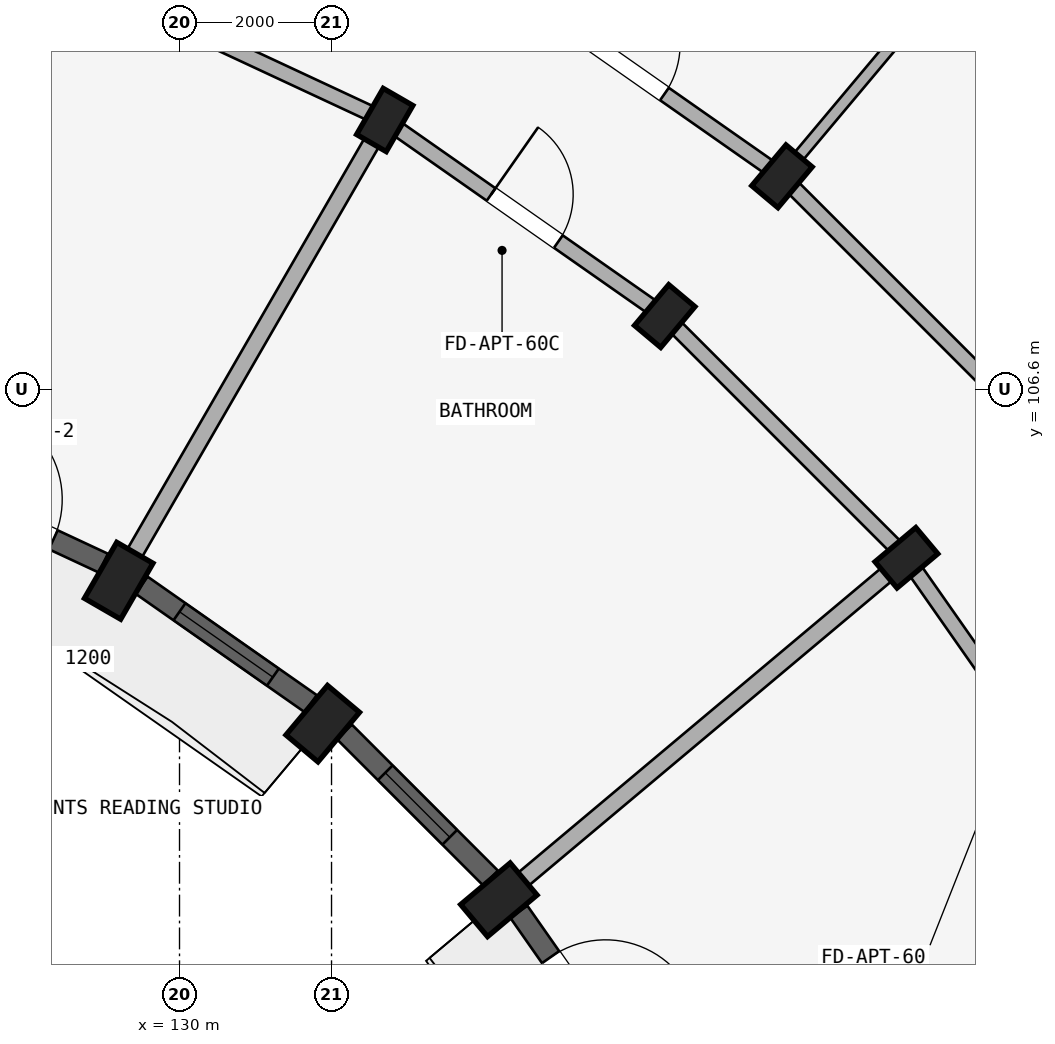
"""IFC4 building model, lengths in metres.
Left out: names, types, materials, properties, quantities, classifications, styles, units other than length and angle.
Written with IfcOpenShell. Run it as: python <this file> out.ifc"""

import sys

from ifc_helpers import new_model, si_unit, direction, frame, frame_2d, origin, origin_2d, place, context, subcontext, project, spatial, rectangle, extrude, element, fill, save


model = new_model("IFC4")
c1 = context("Model", 3, precision=1e-05, world=origin(), true_north=direction((0.0, 1.0)))
c2 = subcontext(c1, "Body", "Model", "MODEL_VIEW")
j1 = project(units=[si_unit("LENGTHUNIT", "METRE"), si_unit("PLANEANGLEUNIT", "RADIAN")], contexts=[c1])
p1 = place(None, origin())
s1 = spatial("IfcSite", under=j1, at=p1, CompositionType="ELEMENT")
p2 = place(p1, origin())
s2 = spatial("IfcBuilding", under=s1, at=p2, CompositionType="ELEMENT")
p3 = place(p2, frame((0.0, 0.0, 15.0)))
s3 = spatial("IfcBuildingStorey", under=s2, at=p3, CompositionType="ELEMENT", Elevation=15.0)
p4 = place(p3, frame((129.2, 104.081, 0.0), z_axis=(0.0, 0.0, 1.0), x_axis=(-0.866025403784, 0.5, 0.0)))
e1 = element("IfcColumn", 1, at=p4, inside=s3, PredefinedType="COLUMN", context=c2, shape_type="SweptSolid", body=[
    extrude(rectangle(XDim=0.55, YDim=0.85, at=origin_2d()), origin(), (0.0, 0.0, 1.0), 2.93),
])
p5 = place(p3, frame((132.7, 110.144, 0.0), z_axis=(0.0, 0.0, 1.0), x_axis=(-0.866025403784, 0.5, 0.0)))
e2 = element("IfcColumn", 2, at=p5, inside=s3, PredefinedType="COLUMN", context=c2, shape_type="SweptSolid", body=[
    extrude(rectangle(XDim=0.45, YDim=0.7, at=origin_2d()), origin(), (0.0, 0.0, 1.0), 2.93),
])
p6 = place(p3, frame((131.885, 102.202, 0.0), z_axis=(0.0, 0.0, 1.0), x_axis=(-0.766044443119, 0.642787609687, 0.0)))
e3 = element("IfcColumn", 3, at=p6, inside=s3, PredefinedType="COLUMN", context=c2, shape_type="SweptSolid", body=[
    extrude(rectangle(XDim=0.55, YDim=0.85, at=origin_2d()), origin(), (0.0, 0.0, 1.0), 2.93),
])
for number, where, z_axis, x_axis in (
    (4, (136.384, 107.564, 0.0), (0.0, 0.0, 1.0), (-0.766, 0.643, 0.0)),
    (5, (137.927, 109.402, 0.0), (0.0, 0.0, 1.0), (-0.766, 0.643, 0.0)),
):
    element("IfcColumn", number, at=place(p3, frame(where, z_axis=z_axis, x_axis=x_axis)), inside=s3, PredefinedType="COLUMN", context=c2, shape_type="SweptSolid", body=[
        extrude(rectangle(XDim=0.45, YDim=0.7, at=origin_2d()), origin(), (0.0, 0.0, 1.0), 2.93),
    ])
p7 = place(p3, frame((134.202, 99.885, 0.0), z_axis=(0.0, 0.0, 1.0), x_axis=(-0.642787609687, 0.766044443119, 0.0)))
e6 = element("IfcColumn", 6, at=p7, inside=s3, PredefinedType="COLUMN", context=c2, shape_type="SweptSolid", body=[
    extrude(rectangle(XDim=0.55, YDim=0.85, at=origin_2d()), origin(), (0.0, 0.0, 1.0), 2.93),
])
p8 = place(p3, frame((139.564, 104.384, 0.0), z_axis=(0.0, 0.0, 1.0), x_axis=(-0.642787609687, 0.766044443119, 0.0)))
e7 = element("IfcColumn", 7, at=p8, inside=s3, PredefinedType="COLUMN", context=c2, shape_type="SweptSolid", body=[
    extrude(rectangle(XDim=0.45, YDim=0.7, at=origin_2d()), origin(), (0.0, 0.0, 1.0), 2.93),
])
p9 = place(p3, frame((128.624, 112.044, 0.0), z_axis=(0.0, 0.0, 1.0), x_axis=(0.906307919131, -0.422617978463, 0.0)))
e8 = element("IfcWall", 8, at=p9, inside=s3, PredefinedType="STANDARD", context=c2, shape_type="SweptSolid", body=[
    extrude(rectangle(XDim=4.497, YDim=0.2, at=frame_2d((2.249, 0.0))), origin(), (0.0, 0.0, 1.0), 2.372),
])
p10 = place(p3, frame((132.7, 110.144, 0.0), z_axis=(0.0, 0.0, 1.0), x_axis=(0.819155404658, -0.573571637217, 0.0)))
e9 = element("IfcWall", 9, at=p10, inside=s3, PredefinedType="STANDARD", context=c2, shape_type="SweptSolid", body=[
    extrude(rectangle(XDim=4.497, YDim=0.2, at=frame_2d((2.249, 0.0))), origin(), (0.0, 0.0, 1.0), 2.372),
])
p11 = place(p10, frame((1.709, 0.0, 0.0)))
e10 = element("IfcOpeningElement", 10, at=p11, cuts=e9, PredefinedType="OPENING", context=c2, shape_type="SweptSolid", body=[
    extrude(rectangle(XDim=1.08, YDim=2.15, at=frame_2d((0.54, 1.075))), frame((0.0, 0.11, 0.0), z_axis=(0.0, -1.0, 0.0), x_axis=(1.0, 0.0, 0.0)), (0.0, 0.0, 1.0), 0.22),
])
p12 = place(p3, frame((133.9, 112.222, 0.0), z_axis=(0.0, 0.0, 1.0), x_axis=(0.819140911474, -0.573592335331, 0.0)))
e11 = element("IfcWall", 11, at=p12, inside=s3, PredefinedType="STANDARD", context=c2, shape_type="SweptSolid", body=[
    extrude(rectangle(XDim=4.916, YDim=0.2, at=frame_2d((2.458, 0.0))), origin(), (0.0, 0.0, 1.0), 2.372),
])
p13 = place(p12, frame((1.888, 0.0, 0.0)))
e12 = element("IfcOpeningElement", 12, at=p13, cuts=e11, PredefinedType="OPENING", context=c2, shape_type="SweptSolid", body=[
    extrude(rectangle(XDim=1.14, YDim=2.15, at=frame_2d((0.57, 1.075))), frame((0.0, 0.11, 0.0), z_axis=(0.0, -1.0, 0.0), x_axis=(1.0, 0.0, 0.0)), (0.0, 0.0, 1.0), 0.22),
])
p14 = place(p3, frame((136.384, 107.564, 0.0), z_axis=(0.0, 0.0, 1.0), x_axis=(0.707106781187, -0.707106781187, 0.0)))
e13 = element("IfcWall", 13, at=p14, inside=s3, PredefinedType="STANDARD", context=c2, shape_type="SweptSolid", body=[
    extrude(rectangle(XDim=4.497, YDim=0.2, at=frame_2d((2.249, 0.0))), origin(), (0.0, 0.0, 1.0), 2.372),
])
p15 = place(p3, frame((137.927, 109.402, 0.0), z_axis=(0.0, 0.0, 1.0), x_axis=(0.707106781187, -0.707106781187, 0.0)))
e14 = element("IfcWall", 14, at=p15, inside=s3, PredefinedType="STANDARD", context=c2, shape_type="SweptSolid", body=[
    extrude(rectangle(XDim=4.916, YDim=0.2, at=frame_2d((2.458, 0.0))), origin(), (0.0, 0.0, 1.0), 2.372),
])
p16 = place(p3, frame((139.564, 104.384, 0.0), z_axis=(0.0, 0.0, 1.0), x_axis=(0.573571637217, -0.819155404658, 0.0)))
e15 = element("IfcWall", 15, at=p16, inside=s3, PredefinedType="STANDARD", context=c2, shape_type="SweptSolid", body=[
    extrude(rectangle(XDim=4.497, YDim=0.2, at=frame_2d((2.249, 0.0))), origin(), (0.0, 0.0, 1.0), 2.372),
])
p17 = place(p16, frame((1.749, 0.0, 0.0)))
e16 = element("IfcOpeningElement", 16, at=p17, cuts=e15, PredefinedType="OPENING", context=c2, shape_type="SweptSolid", body=[
    extrude(rectangle(XDim=1.0, YDim=2.15, at=frame_2d((0.5, 1.075))), frame((0.0, 0.11, 0.0), z_axis=(0.0, -1.0, 0.0), x_axis=(1.0, 0.0, 0.0)), (0.0, 0.0, 1.0), 0.22),
])
p18 = place(p3, frame((129.3, 104.254, 0.0), z_axis=(0.0, 0.0, 1.0), x_axis=(0.499997969693, 0.866026575979, 0.0)))
e17 = element("IfcWall", 17, at=p18, inside=s3, PredefinedType="STANDARD", context=c2, shape_type="SweptSolid", body=[
    extrude(rectangle(XDim=6.75, YDim=0.22, at=frame_2d((3.375, 0.0))), origin(), (0.0, 0.0, 1.0), 2.372),
])
p19 = place(p3, frame((137.991, 109.479, 0.0), z_axis=(0.0, 0.0, 1.0), x_axis=(0.642784757967, 0.766046835987, 0.0)))
e18 = element("IfcWall", 18, at=p19, inside=s3, PredefinedType="PARTITIONING", context=c2, shape_type="SweptSolid", body=[
    extrude(rectangle(XDim=17.42, YDim=0.15, at=frame_2d((8.71, 0.0))), origin(), (0.0, 0.0, 1.0), 2.372),
])
p20 = place(p19, frame((7.5, 0.0, 0.0)))
e19 = element("IfcOpeningElement", 19, at=p20, cuts=e18, PredefinedType="OPENING", context=c2, shape_type="SweptSolid", body=[
    extrude(rectangle(XDim=0.8, YDim=2.1, at=frame_2d((0.4, 1.05))), frame((0.0, 0.085, 0.0), z_axis=(0.0, -1.0, 0.0), x_axis=(1.0, 0.0, 0.0)), (0.0, 0.0, 1.0), 0.17),
])
p21 = place(p3, frame((134.355, 100.013, 0.0), z_axis=(0.0, 0.0, 1.0), x_axis=(0.766046761698, 0.642784846501, 0.0)))
e20 = element("IfcWall", 20, at=p21, inside=s3, PredefinedType="STANDARD", context=c2, shape_type="SweptSolid", body=[
    extrude(rectangle(XDim=6.75, YDim=0.22, at=frame_2d((3.375, 0.0))), origin(), (0.0, 0.0, 1.0), 2.372),
])
p22 = place(p3, frame((140.08, 111.969, 0.0), z_axis=(0.0, 0.0, 1.0), x_axis=(0.707106781187, -0.707106781187, 0.0)))
e21 = element("IfcWall", 21, at=p22, inside=s3, PredefinedType="PLUMBINGWALL", context=c2, shape_type="SweptSolid", body=[
    extrude(rectangle(XDim=5.5, YDim=0.15, at=frame_2d((2.75, 0.0))), origin(), (0.0, 0.0, 1.0), 2.372),
])
p23 = place(p22, frame((2.37, 0.0, 0.0)))
e22 = element("IfcOpeningElement", 22, at=p23, cuts=e21, PredefinedType="OPENING", context=c2, shape_type="SweptSolid", body=[
    extrude(rectangle(XDim=0.76, YDim=2.05, at=frame_2d((0.38, 1.025))), frame((0.0, 0.085, 0.0), z_axis=(0.0, -1.0, 0.0), x_axis=(1.0, 0.0, 0.0)), (0.0, 0.0, 1.0), 0.17),
])
p24 = place(p3, frame((126.536, 105.461, 0.0), z_axis=(0.0, 0.0, 1.0), x_axis=(0.906311629168, -0.422610022166, 0.0)))
e23 = element("IfcWall", 23, at=p24, inside=s3, PredefinedType="STANDARD", context=c2, shape_type="SweptSolid", body=[
    extrude(rectangle(XDim=2.718, YDim=0.275, at=frame_2d((1.359, 0.0))), origin(), (0.0, 0.0, 1.0), 2.472),
])
p25 = place(p24, frame((0.729, 0.0, 0.0)))
e24 = element("IfcOpeningElement", 24, at=p25, cuts=e23, PredefinedType="OPENING", context=c2, shape_type="SweptSolid", body=[
    extrude(rectangle(XDim=1.26, YDim=2.15, at=frame_2d((0.63, 1.075))), frame((0.0, 0.147, 0.0), z_axis=(0.0, -1.0, 0.0), x_axis=(1.0, 0.0, 0.0)), (0.0, 0.0, 1.0), 0.295),
])
p26 = place(p3, frame((129.501, 104.023, 0.0), z_axis=(0.0, 0.0, 1.0), x_axis=(0.81917282593, -0.573546755948, 0.0)))
e25 = element("IfcWall", 25, at=p26, inside=s3, PredefinedType="STANDARD", context=c2, shape_type="SweptSolid", body=[
    extrude(rectangle(XDim=2.718, YDim=0.275, at=frame_2d((1.359, 0.0))), origin(), (0.0, 0.0, 1.0), 2.472),
])
p27 = place(p26, frame((0.609, 0.0, 0.622)))
e26 = element("IfcOpeningElement", 26, at=p27, cuts=e25, PredefinedType="OPENING", context=c2, shape_type="SweptSolid", body=[
    extrude(rectangle(XDim=1.5, YDim=1.65, at=frame_2d((0.75, 0.825))), frame((0.0, 0.147, 0.0), z_axis=(0.0, -1.0, 0.0), x_axis=(1.0, 0.0, 0.0)), (0.0, 0.0, 1.0), 0.295),
])
p28 = place(p3, frame((132.171, 102.092, 0.0), z_axis=(0.0, 0.0, 1.0), x_axis=(0.707106781187, -0.707106781187, 0.0)))
e27 = element("IfcWall", 27, at=p28, inside=s3, PredefinedType="STANDARD", context=c2, shape_type="SweptSolid", body=[
    extrude(rectangle(XDim=2.718, YDim=0.275, at=frame_2d((1.359, 0.0))), origin(), (0.0, 0.0, 1.0), 2.472),
])
p29 = place(p28, frame((0.759, 0.0, 0.772)))
e28 = element("IfcOpeningElement", 28, at=p29, cuts=e27, PredefinedType="OPENING", context=c2, shape_type="SweptSolid", body=[
    extrude(rectangle(XDim=1.2, YDim=1.5, at=frame_2d((0.6, 0.75))), frame((0.0, 0.147, 0.0), z_axis=(0.0, -1.0, 0.0), x_axis=(1.0, 0.0, 0.0)), (0.0, 0.0, 1.0), 0.295),
])
p30 = place(p3, frame((134.465, 99.727, 0.0), z_axis=(0.0, 0.0, 1.0), x_axis=(0.573546755948, -0.81917282593, 0.0)))
e29 = element("IfcWall", 29, at=p30, inside=s3, PredefinedType="STANDARD", context=c2, shape_type="SweptSolid", body=[
    extrude(rectangle(XDim=2.718, YDim=0.275, at=frame_2d((1.359, 0.0))), origin(), (0.0, 0.0, 1.0), 2.472),
])
p31 = place(p30, frame((0.729, 0.0, 0.0)))
e30 = element("IfcOpeningElement", 30, at=p31, cuts=e29, PredefinedType="OPENING", context=c2, shape_type="SweptSolid", body=[
    extrude(rectangle(XDim=1.26, YDim=2.15, at=frame_2d((0.63, 1.075))), frame((0.0, 0.147, 0.0), z_axis=(0.0, -1.0, 0.0), x_axis=(1.0, 0.0, 0.0)), (0.0, 0.0, 1.0), 0.295),
])
p32 = place(p27, origin())
e31 = element("IfcWindow", 31, at=p32, inside=s3, PartitioningType="DOUBLE_PANEL_VERTICAL", PredefinedType="WINDOW", context=c2, shape_type="SweptSolid", body=[
    extrude(rectangle(XDim=1.5, YDim=1.65, at=frame_2d((0.75, 0.825))), frame((0.0, 0.03, 0.0), z_axis=(0.0, -1.0, 0.0), x_axis=(1.0, 0.0, 0.0)), (0.0, 0.0, 1.0), 0.06),
])
fill(e26, e31)
p33 = place(p29, origin())
e32 = element("IfcWindow", 32, at=p33, inside=s3, PartitioningType="SINGLE_PANEL", PredefinedType="WINDOW", context=c2, shape_type="SweptSolid", body=[
    extrude(rectangle(XDim=1.2, YDim=1.5, at=frame_2d((0.6, 0.75))), frame((0.0, 0.03, 0.0), z_axis=(0.0, -1.0, 0.0), x_axis=(1.0, 0.0, 0.0)), (0.0, 0.0, 1.0), 0.06),
])
fill(e28, e32)
p34 = place(p13, frame((1.14, 0.0, 0.0), z_axis=(0.0, 0.0, 1.0), x_axis=(-1.0, 0.0, 0.0)))
e33 = element("IfcDoor", 33, at=p34, inside=s3, OperationType="SINGLE_SWING_RIGHT", PredefinedType="DOOR", context=c2, shape_type="SweptSolid", body=[
    extrude(rectangle(XDim=1.14, YDim=2.15, at=frame_2d((0.57, 1.075))), frame((0.0, 0.025, 0.0), z_axis=(0.0, -1.0, 0.0), x_axis=(1.0, 0.0, 0.0)), (0.0, 0.0, 1.0), 0.05),
])
fill(e12, e33)
p35 = place(p11, origin())
e34 = element("IfcDoor", 34, at=p35, inside=s3, OperationType="SINGLE_SWING_LEFT", PredefinedType="DOOR", context=c2, shape_type="SweptSolid", body=[
    extrude(rectangle(XDim=1.08, YDim=2.15, at=frame_2d((0.54, 1.075))), frame((0.0, 0.025, 0.0), z_axis=(0.0, -1.0, 0.0), x_axis=(1.0, 0.0, 0.0)), (0.0, 0.0, 1.0), 0.05),
])
fill(e10, e34)
p36 = place(p25, frame((1.26, 0.0, 0.0), z_axis=(0.0, 0.0, 1.0), x_axis=(-1.0, 0.0, 0.0)))
e35 = element("IfcDoor", 35, at=p36, inside=s3, OperationType="SINGLE_SWING_RIGHT", PredefinedType="DOOR", context=c2, shape_type="SweptSolid", body=[
    extrude(rectangle(XDim=1.26, YDim=2.15, at=frame_2d((0.63, 1.075))), frame((0.0, 0.025, 0.0), z_axis=(0.0, -1.0, 0.0), x_axis=(1.0, 0.0, 0.0)), (0.0, 0.0, 1.0), 0.05),
])
fill(e24, e35)
p37 = place(p31, frame((1.26, 0.0, 0.0), z_axis=(0.0, 0.0, 1.0), x_axis=(-1.0, 0.0, 0.0)))
e36 = element("IfcDoor", 36, at=p37, inside=s3, OperationType="SINGLE_SWING_LEFT", PredefinedType="DOOR", context=c2, shape_type="SweptSolid", body=[
    extrude(rectangle(XDim=1.26, YDim=2.15, at=frame_2d((0.63, 1.075))), frame((0.0, 0.025, 0.0), z_axis=(0.0, -1.0, 0.0), x_axis=(1.0, 0.0, 0.0)), (0.0, 0.0, 1.0), 0.05),
])
fill(e30, e36)
save(model, sys.argv[1])
